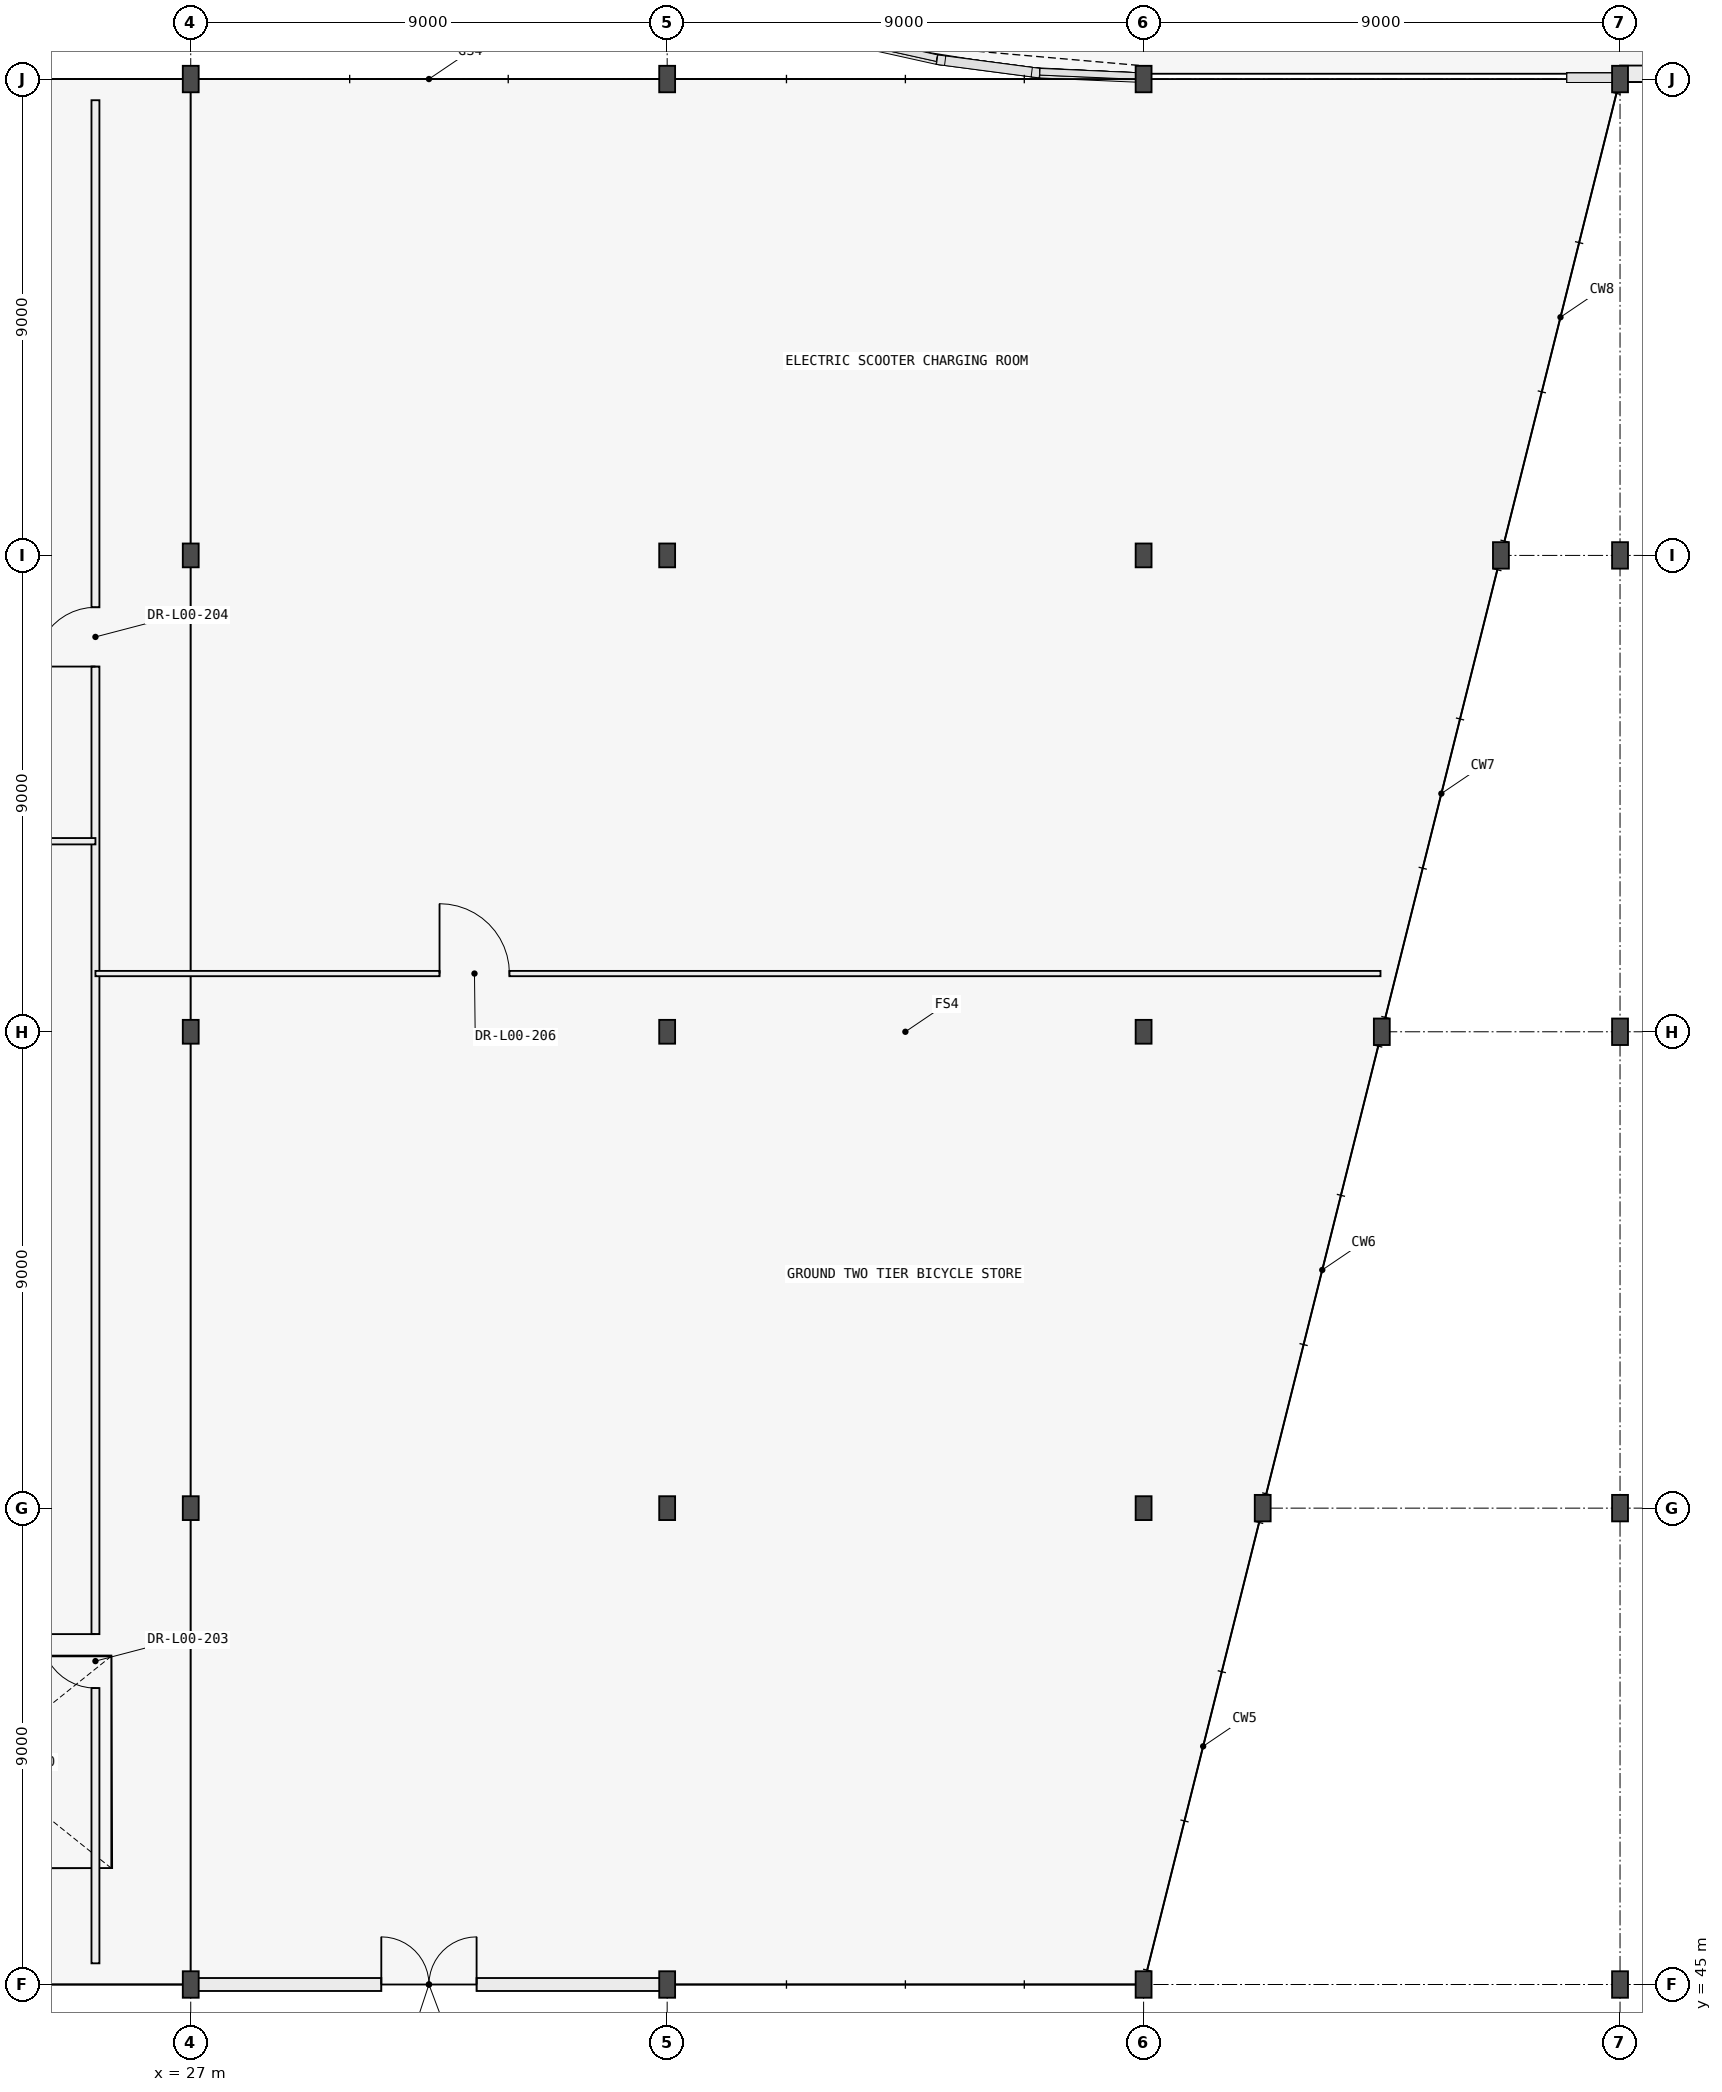
"""IFC4 building model, lengths in metres.
Left out: names, types, materials, properties, quantities, classifications, styles, units other than length and angle.
Written with IfcOpenShell. Run it as: python <this file> out.ifc"""

import sys

from ifc_helpers import new_model, si_unit, direction, frame, frame_2d, origin, origin_2d, place, context, subcontext, project, spatial, rectangle, i_section, extrude, element, fill, save


model = new_model("IFC4")
c1 = context("Model", 3, precision=1e-05, world=origin(), true_north=direction((0.0, 1.0)))
c2 = subcontext(c1, "Body", "Model", "MODEL_VIEW")
j1 = project(units=[si_unit("LENGTHUNIT", "METRE"), si_unit("PLANEANGLEUNIT", "RADIAN")], contexts=[c1])
p1 = place(None, origin())
s1 = spatial("IfcSite", under=j1, at=p1, CompositionType="ELEMENT")
p2 = place(p1, origin())
s2 = spatial("IfcBuilding", under=s1, at=p2, CompositionType="ELEMENT")
p3 = place(p2, origin())
s3 = spatial("IfcBuildingStorey", under=s2, at=p3, CompositionType="ELEMENT", Elevation=0.0)
for number, where, z_axis, x_axis in (
    (1, (27.0, 45.0, 0.0), (0.0, 0.0, 1.0), (1.0, 0.0, 0.0)),
    (2, (36.0, 45.0, 0.0), (0.0, 0.0, 1.0), (1.0, 0.0, 0.0)),
    (3, (45.0, 45.0, 0.0), (0.0, 0.0, 1.0), (1.0, 0.0, 0.0)),
):
    element("IfcColumn", number, at=place(p3, frame(where, z_axis=z_axis, x_axis=x_axis)), inside=s3, PredefinedType="COLUMN", context=c2, shape_type="SweptSolid", body=[
        extrude(i_section(OverallWidth=0.3, OverallDepth=0.5, WebThickness=0.014, FlangeThickness=0.028, FilletRadius=0.027, at=origin_2d()), origin(), (0.0, 0.0, 1.0), 4.2),
    ])
for number, where, z_axis, x_axis in (
    (4, (27.0, 54.0, 0.0), (0.0, 0.0, 1.0), (1.0, 0.0, 0.0)),
    (5, (36.0, 54.0, 0.0), (0.0, 0.0, 1.0), (1.0, 0.0, 0.0)),
    (6, (45.0, 54.0, 0.0), (0.0, 0.0, 1.0), (1.0, 0.0, 0.0)),
):
    element("IfcColumn", number, at=place(p3, frame(where, z_axis=z_axis, x_axis=x_axis)), inside=s3, PredefinedType="COLUMN", context=c2, shape_type="SweptSolid", body=[
        extrude(i_section(OverallWidth=0.3, OverallDepth=0.45, WebThickness=0.014, FlangeThickness=0.026, FilletRadius=0.027, at=origin_2d()), origin(), (0.0, 0.0, 1.0), 4.2),
    ])
p4 = place(p3, frame((47.25, 54.0, 0.0), z_axis=(0.0, 0.0, 1.0), x_axis=(1.0, 0.0, 0.0)))
e7 = element("IfcColumn", 7, at=p4, inside=s3, PredefinedType="COLUMN", context=c2, shape_type="SweptSolid", body=[
    extrude(i_section(OverallWidth=0.3, OverallDepth=0.5, WebThickness=0.014, FlangeThickness=0.028, FilletRadius=0.027, at=origin_2d()), origin(), (0.0, 0.0, 1.0), 4.2),
])
for number, where, z_axis, x_axis in (
    (8, (27.0, 63.0, 0.0), (0.0, 0.0, 1.0), (1.0, 0.0, 0.0)),
    (9, (36.0, 63.0, 0.0), (0.0, 0.0, 1.0), (1.0, 0.0, 0.0)),
    (10, (45.0, 63.0, 0.0), (0.0, 0.0, 1.0), (1.0, 0.0, 0.0)),
):
    element("IfcColumn", number, at=place(p3, frame(where, z_axis=z_axis, x_axis=x_axis)), inside=s3, PredefinedType="COLUMN", context=c2, shape_type="SweptSolid", body=[
        extrude(i_section(OverallWidth=0.3, OverallDepth=0.45, WebThickness=0.014, FlangeThickness=0.026, FilletRadius=0.027, at=origin_2d()), origin(), (0.0, 0.0, 1.0), 4.2),
    ])
p5 = place(p3, frame((49.5, 63.0, 0.0), z_axis=(0.0, 0.0, 1.0), x_axis=(1.0, 0.0, 0.0)))
e11 = element("IfcColumn", 11, at=p5, inside=s3, PredefinedType="COLUMN", context=c2, shape_type="SweptSolid", body=[
    extrude(i_section(OverallWidth=0.3, OverallDepth=0.5, WebThickness=0.014, FlangeThickness=0.028, FilletRadius=0.027, at=origin_2d()), origin(), (0.0, 0.0, 1.0), 4.2),
])
for number, where, z_axis, x_axis in (
    (12, (27.0, 72.0, 0.0), (0.0, 0.0, 1.0), (1.0, 0.0, 0.0)),
    (13, (36.0, 72.0, 0.0), (0.0, 0.0, 1.0), (1.0, 0.0, 0.0)),
    (14, (45.0, 72.0, 0.0), (0.0, 0.0, 1.0), (1.0, 0.0, 0.0)),
):
    element("IfcColumn", number, at=place(p3, frame(where, z_axis=z_axis, x_axis=x_axis)), inside=s3, PredefinedType="COLUMN", context=c2, shape_type="SweptSolid", body=[
        extrude(i_section(OverallWidth=0.3, OverallDepth=0.45, WebThickness=0.014, FlangeThickness=0.026, FilletRadius=0.027, at=origin_2d()), origin(), (0.0, 0.0, 1.0), 4.2),
    ])
for number, where, z_axis, x_axis in (
    (15, (51.75, 72.0, 0.0), (0.0, 0.0, 1.0), (1.0, 0.0, 0.0)),
    (16, (27.0, 81.0, 0.0), (0.0, 0.0, 1.0), (1.0, 0.0, 0.0)),
    (17, (36.0, 81.0, 0.0), (0.0, 0.0, 1.0), (1.0, 0.0, 0.0)),
    (18, (45.0, 81.0, 0.0), (0.0, 0.0, 1.0), (1.0, 0.0, 0.0)),
    (19, (54.0, 81.0, 0.0), (0.0, 0.0, 1.0), (1.0, 0.0, 0.0)),
    (20, (54.0, 54.0, 0.0), (0.0, 0.0, 1.0), (1.0, 0.0, 0.0)),
    (21, (54.0, 63.0, 0.0), (0.0, 0.0, 1.0), (1.0, 0.0, 0.0)),
    (22, (54.0, 45.0, 0.0), (0.0, 0.0, 1.0), (1.0, 0.0, 0.0)),
    (23, (54.0, 72.0, 0.0), (0.0, 0.0, 1.0), (1.0, 0.0, 0.0)),
):
    element("IfcColumn", number, at=place(p3, frame(where, z_axis=z_axis, x_axis=x_axis)), inside=s3, PredefinedType="COLUMN", context=c2, shape_type="SweptSolid", body=[
        extrude(i_section(OverallWidth=0.3, OverallDepth=0.5, WebThickness=0.014, FlangeThickness=0.028, FilletRadius=0.027, at=origin_2d()), origin(), (0.0, 0.0, 1.0), 4.2),
    ])
p6 = place(p3, frame((27.007, 45.0, 0.0), z_axis=(0.0, 0.0, 1.0), x_axis=(1.0, 0.0, 0.0)))
e24 = element("IfcWall", 24, at=p6, inside=s3, PredefinedType="STANDARD", context=c2, shape_type="SweptSolid", body=[
    extrude(rectangle(XDim=8.986, YDim=0.245, at=frame_2d((4.493, 0.0))), origin(), (0.0, 0.0, 1.0), 3.425),
])
p7 = place(p6, frame((3.593, 0.0, 0.0)))
e25 = element("IfcOpeningElement", 25, at=p7, cuts=e24, PredefinedType="OPENING", context=c2, shape_type="SweptSolid", body=[
    extrude(rectangle(XDim=1.8, YDim=2.2, at=frame_2d((0.9, 1.1))), frame((0.0, 0.133, 0.0), z_axis=(0.0, -1.0, 0.0), x_axis=(1.0, 0.0, 0.0)), (0.0, 0.0, 1.0), 0.265),
])
p8 = place(p3, frame((54.0, 81.1, 0.0), z_axis=(0.0, 0.0, 1.0), x_axis=(1.0, 0.0, 0.0)))
e26 = element("IfcWall", 26, at=p8, inside=s3, PredefinedType="STANDARD", context=c2, shape_type="SweptSolid", body=[
    extrude(rectangle(XDim=9.0, YDim=0.31, at=frame_2d((4.5, 0.0))), origin(), (0.0, 0.0, 1.0), 3.425),
])
p9 = place(p8, frame((3.5, 0.0, 0.0)))
e27 = element("IfcOpeningElement", 27, at=p9, cuts=e26, PredefinedType="OPENING", context=c2, shape_type="SweptSolid", body=[
    extrude(rectangle(XDim=2.0, YDim=2.3, at=frame_2d((1.0, 1.15))), frame((0.0, 0.165, 0.0), z_axis=(0.0, -1.0, 0.0), x_axis=(1.0, 0.0, 0.0)), (0.0, 0.0, 1.0), 0.33),
])
p10 = place(p3, frame((25.2, 45.4, 0.0), z_axis=(0.0, 0.0, 1.0), x_axis=(0.0, 1.0, 0.0)))
e28 = element("IfcWall", 28, at=p10, inside=s3, PredefinedType="PARTITIONING", context=c2, shape_type="SweptSolid", body=[
    extrude(rectangle(XDim=35.2, YDim=0.15, at=frame_2d((17.6, 0.0))), origin(), (0.0, 0.0, 1.0), 3.95),
])
p11 = place(p10, frame((5.2, 0.0, 0.0)))
e29 = element("IfcOpeningElement", 29, at=p11, cuts=e28, PredefinedType="OPENING", context=c2, shape_type="SweptSolid", body=[
    extrude(rectangle(XDim=1.02, YDim=2.12, at=frame_2d((0.51, 1.06))), frame((0.0, 0.085, 0.0), z_axis=(0.0, -1.0, 0.0), x_axis=(1.0, 0.0, 0.0)), (0.0, 0.0, 1.0), 0.17),
])
p12 = place(p10, frame((24.5, 0.0, 0.0)))
e30 = element("IfcOpeningElement", 30, at=p12, cuts=e28, PredefinedType="OPENING", context=c2, shape_type="SweptSolid", body=[
    extrude(rectangle(XDim=1.12, YDim=2.15, at=frame_2d((0.56, 1.075))), frame((0.0, 0.085, 0.0), z_axis=(0.0, -1.0, 0.0), x_axis=(1.0, 0.0, 0.0)), (0.0, 0.0, 1.0), 0.17),
])
p13 = place(p3, frame((0.4, 66.6, 0.0), z_axis=(0.0, 0.0, 1.0), x_axis=(1.0, 0.0, 0.0)))
e31 = element("IfcWall", 31, at=p13, inside=s3, PredefinedType="PARTITIONING", context=c2, shape_type="SweptSolid", body=[
    extrude(rectangle(XDim=24.8, YDim=0.12, at=frame_2d((12.4, 0.0))), origin(), (0.0, 0.0, 1.0), 3.95),
])
p14 = place(p13, frame((5.8, 0.0, 0.0)))
e32 = element("IfcOpeningElement", 32, at=p14, cuts=e31, PredefinedType="OPENING", context=c2, shape_type="SweptSolid", body=[
    extrude(rectangle(XDim=1.22, YDim=2.18, at=frame_2d((0.61, 1.09))), frame((0.0, 0.07, 0.0), z_axis=(0.0, -1.0, 0.0), x_axis=(1.0, 0.0, 0.0)), (0.0, 0.0, 1.0), 0.14),
])
p15 = place(p3, frame((25.2, 64.1, 0.0), z_axis=(0.0, 0.0, 1.0), x_axis=(1.0, 0.0, 0.0)))
e33 = element("IfcWall", 33, at=p15, inside=s3, PredefinedType="PARTITIONING", context=c2, shape_type="SweptSolid", body=[
    extrude(rectangle(XDim=24.275, YDim=0.1, at=frame_2d((12.138, 0.0))), origin(), (0.0, 0.0, 1.0), 3.95),
])
p16 = place(p15, frame((6.5, 0.0, 0.0)))
e34 = element("IfcOpeningElement", 34, at=p16, cuts=e33, PredefinedType="OPENING", context=c2, shape_type="SweptSolid", body=[
    extrude(rectangle(XDim=1.32, YDim=2.2, at=frame_2d((0.66, 1.1))), frame((0.0, 0.06, 0.0), z_axis=(0.0, -1.0, 0.0), x_axis=(1.0, 0.0, 0.0)), (0.0, 0.0, 1.0), 0.12),
])
p17 = place(p7, frame((1.8, 0.0, 0.0), z_axis=(0.0, 0.0, 1.0), x_axis=(-1.0, 0.0, 0.0)))
e35 = element("IfcDoor", 35, at=p17, inside=s3, OperationType="DOUBLE_DOOR_SINGLE_SWING", PredefinedType="DOOR", context=c2, shape_type="SweptSolid", body=[
    extrude(rectangle(XDim=1.8, YDim=2.2, at=frame_2d((0.9, 1.1))), frame((0.0, 0.025, 0.0), z_axis=(0.0, -1.0, 0.0), x_axis=(1.0, 0.0, 0.0)), (0.0, 0.0, 1.0), 0.05),
])
fill(e25, e35)
p18 = place(p11, origin())
e36 = element("IfcDoor", 36, at=p18, inside=s3, OperationType="SINGLE_SWING_RIGHT", PredefinedType="DOOR", context=c2, shape_type="SweptSolid", body=[
    extrude(rectangle(XDim=1.02, YDim=2.12, at=frame_2d((0.51, 1.06))), frame((0.0, 0.025, 0.0), z_axis=(0.0, -1.0, 0.0), x_axis=(1.0, 0.0, 0.0)), (0.0, 0.0, 1.0), 0.05),
])
fill(e29, e36)
p19 = place(p12, origin())
e37 = element("IfcDoor", 37, at=p19, inside=s3, OperationType="SINGLE_SWING_LEFT", PredefinedType="DOOR", context=c2, shape_type="SweptSolid", body=[
    extrude(rectangle(XDim=1.12, YDim=2.15, at=frame_2d((0.56, 1.075))), frame((0.0, 0.025, 0.0), z_axis=(0.0, -1.0, 0.0), x_axis=(1.0, 0.0, 0.0)), (0.0, 0.0, 1.0), 0.05),
])
fill(e30, e37)
p20 = place(p16, origin())
e38 = element("IfcDoor", 38, at=p20, inside=s3, OperationType="SINGLE_SWING_LEFT", PredefinedType="DOOR", context=c2, shape_type="SweptSolid", body=[
    extrude(rectangle(XDim=1.32, YDim=2.2, at=frame_2d((0.66, 1.1))), frame((0.0, 0.025, 0.0), z_axis=(0.0, -1.0, 0.0), x_axis=(1.0, 0.0, 0.0)), (0.0, 0.0, 1.0), 0.05),
])
fill(e34, e38)
save(model, sys.argv[1])
